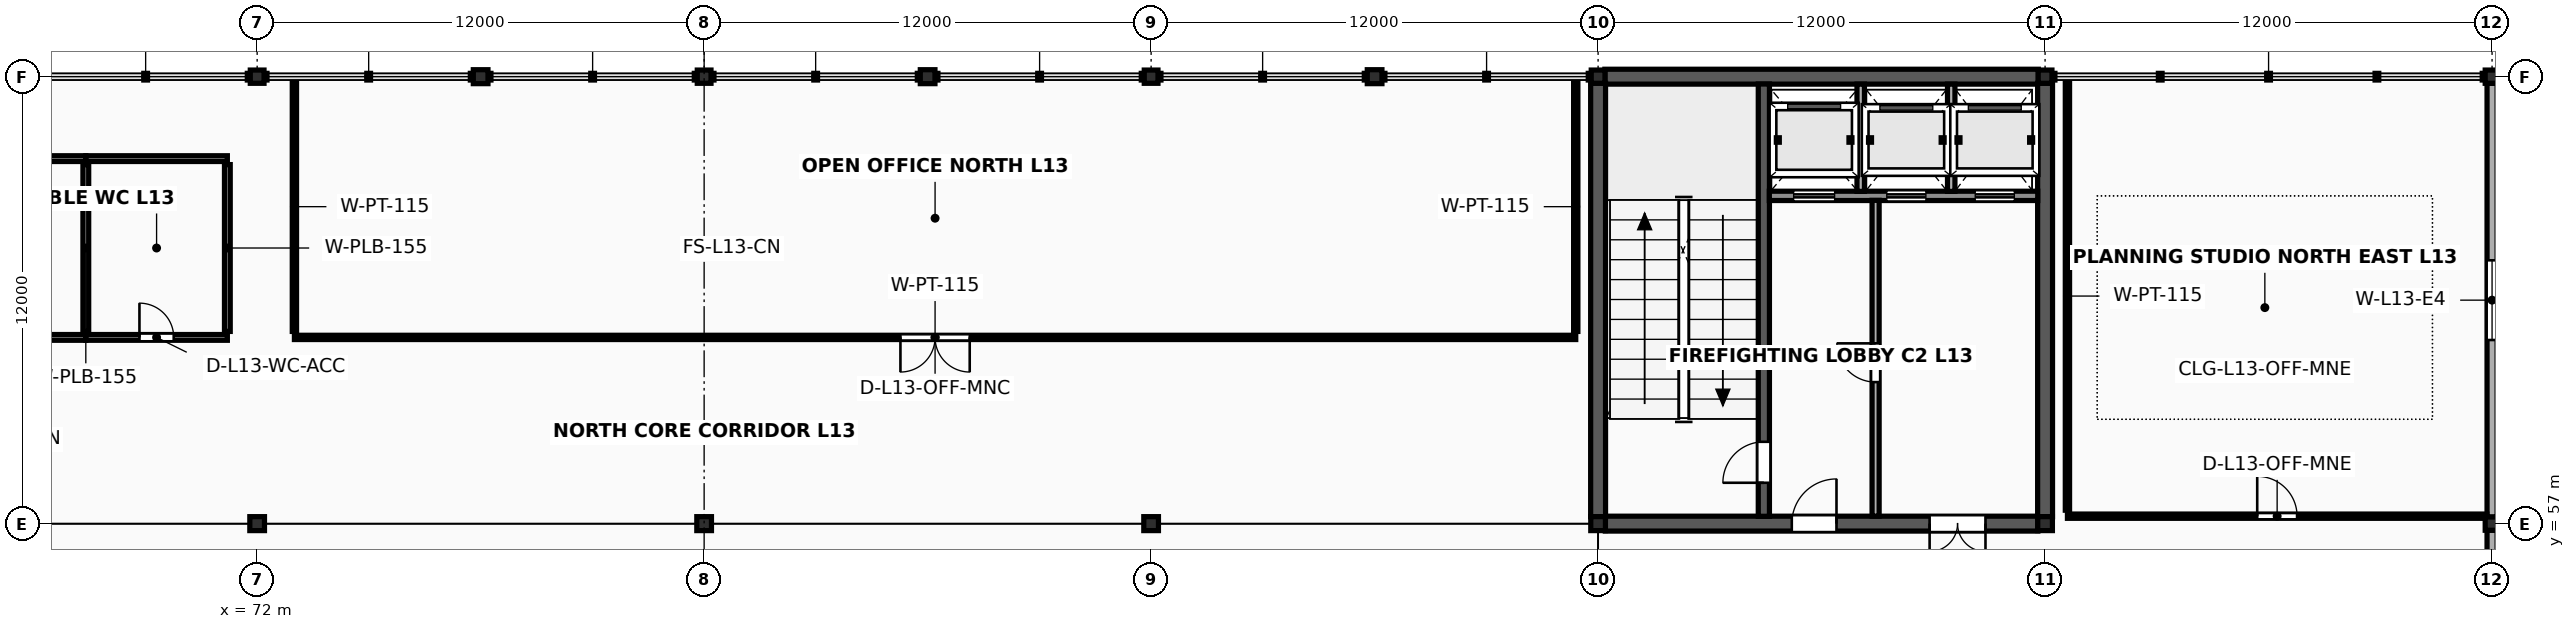
"""IFC4 building model, lengths in metres.
Left out: names, types, materials, properties, quantities, classifications, styles, units other than length and angle.
Written with IfcOpenShell. Run it as: python <this file> out.ifc"""

import sys

from ifc_helpers import new_model, si_unit, direction, frame, frame_2d, origin, origin_2d, place, context, subcontext, project, spatial, rectangle, i_section, extrude, element, fill, save


model = new_model("IFC4")
c1 = context("Model", 3, precision=1e-05, world=origin(), true_north=direction((0.0, 1.0)))
c2 = subcontext(c1, "Body", "Model", "MODEL_VIEW")
j1 = project(units=[si_unit("LENGTHUNIT", "METRE"), si_unit("PLANEANGLEUNIT", "RADIAN")], contexts=[c1])
p1 = place(None, origin())
s1 = spatial("IfcSite", under=j1, at=p1, CompositionType="ELEMENT")
p2 = place(p1, origin())
s2 = spatial("IfcBuilding", under=s1, at=p2, CompositionType="ELEMENT")
p3 = place(p2, frame((0.0, 0.0, 53.6)))
s3 = spatial("IfcBuildingStorey", under=s2, at=p3, CompositionType="ELEMENT", Elevation=53.6)
p4 = place(p3, frame((72.0, 57.0, 0.0), z_axis=(0.0, 0.0, 1.0), x_axis=(1.0, 0.0, 0.0)))
e1 = element("IfcColumn", 1, at=p4, inside=s3, PredefinedType="COLUMN", context=c2, shape_type="SweptSolid", body=[
    extrude(i_section(OverallWidth=0.394, OverallDepth=0.375, WebThickness=0.017, FlangeThickness=0.028, FilletRadius=0.018, at=origin_2d()), origin(), (0.0, 0.0, 1.0), 4.0),
])
p5 = place(p3, frame((72.0, 69.0, 0.0), z_axis=(0.0, 0.0, 1.0), x_axis=(1.0, 0.0, 0.0)))
e2 = element("IfcColumn", 2, at=p5, inside=s3, PredefinedType="COLUMN", context=c2, shape_type="SweptSolid", body=[
    extrude(i_section(OverallWidth=0.369, OverallDepth=0.356, WebThickness=0.011, FlangeThickness=0.018, FilletRadius=0.018, at=origin_2d()), origin(), (0.0, 0.0, 1.0), 4.0),
])
p6 = place(p3, frame((84.0, 57.0, 0.0), z_axis=(0.0, 0.0, 1.0), x_axis=(1.0, 0.0, 0.0)))
e3 = element("IfcColumn", 3, at=p6, inside=s3, PredefinedType="COLUMN", context=c2, shape_type="SweptSolid", body=[
    extrude(i_section(OverallWidth=0.394, OverallDepth=0.375, WebThickness=0.017, FlangeThickness=0.028, FilletRadius=0.018, at=origin_2d()), origin(), (0.0, 0.0, 1.0), 4.0),
])
p7 = place(p3, frame((84.0, 69.0, 0.0), z_axis=(0.0, 0.0, 1.0), x_axis=(1.0, 0.0, 0.0)))
e4 = element("IfcColumn", 4, at=p7, inside=s3, PredefinedType="COLUMN", context=c2, shape_type="SweptSolid", body=[
    extrude(i_section(OverallWidth=0.369, OverallDepth=0.356, WebThickness=0.011, FlangeThickness=0.018, FilletRadius=0.018, at=origin_2d()), origin(), (0.0, 0.0, 1.0), 4.0),
])
p8 = place(p3, frame((96.0, 57.0, 0.0), z_axis=(0.0, 0.0, 1.0), x_axis=(1.0, 0.0, 0.0)))
e5 = element("IfcColumn", 5, at=p8, inside=s3, PredefinedType="COLUMN", context=c2, shape_type="SweptSolid", body=[
    extrude(i_section(OverallWidth=0.394, OverallDepth=0.375, WebThickness=0.017, FlangeThickness=0.028, FilletRadius=0.018, at=origin_2d()), origin(), (0.0, 0.0, 1.0), 4.0),
])
p9 = place(p3, frame((96.0, 69.0, 0.0), z_axis=(0.0, 0.0, 1.0), x_axis=(1.0, 0.0, 0.0)))
e6 = element("IfcColumn", 6, at=p9, inside=s3, PredefinedType="COLUMN", context=c2, shape_type="SweptSolid", body=[
    extrude(i_section(OverallWidth=0.369, OverallDepth=0.356, WebThickness=0.011, FlangeThickness=0.018, FilletRadius=0.018, at=origin_2d()), origin(), (0.0, 0.0, 1.0), 4.0),
])
p10 = place(p3, frame((108.0, 57.0, 0.0), z_axis=(0.0, 0.0, 1.0), x_axis=(1.0, 0.0, 0.0)))
e7 = element("IfcColumn", 7, at=p10, inside=s3, PredefinedType="COLUMN", context=c2, shape_type="SweptSolid", body=[
    extrude(i_section(OverallWidth=0.394, OverallDepth=0.375, WebThickness=0.017, FlangeThickness=0.028, FilletRadius=0.018, at=origin_2d()), origin(), (0.0, 0.0, 1.0), 4.0),
])
p11 = place(p3, frame((108.0, 69.0, 0.0), z_axis=(0.0, 0.0, 1.0), x_axis=(1.0, 0.0, 0.0)))
e8 = element("IfcColumn", 8, at=p11, inside=s3, PredefinedType="COLUMN", context=c2, shape_type="SweptSolid", body=[
    extrude(i_section(OverallWidth=0.369, OverallDepth=0.356, WebThickness=0.011, FlangeThickness=0.018, FilletRadius=0.018, at=origin_2d()), origin(), (0.0, 0.0, 1.0), 4.0),
])
p12 = place(p3, frame((120.0, 57.0, 0.0), z_axis=(0.0, 0.0, 1.0), x_axis=(1.0, 0.0, 0.0)))
e9 = element("IfcColumn", 9, at=p12, inside=s3, PredefinedType="COLUMN", context=c2, shape_type="SweptSolid", body=[
    extrude(i_section(OverallWidth=0.394, OverallDepth=0.375, WebThickness=0.017, FlangeThickness=0.028, FilletRadius=0.018, at=origin_2d()), origin(), (0.0, 0.0, 1.0), 4.0),
])
for number, where, z_axis, x_axis in (
    (10, (120.0, 69.0, 0.0), (0.0, 0.0, 1.0), (1.0, 0.0, 0.0)),
    (11, (132.0, 57.0, 0.0), (0.0, 0.0, 1.0), (1.0, 0.0, 0.0)),
    (12, (132.0, 69.0, 0.0), (0.0, 0.0, 1.0), (1.0, 0.0, 0.0)),
):
    element("IfcColumn", number, at=place(p3, frame(where, z_axis=z_axis, x_axis=x_axis)), inside=s3, PredefinedType="COLUMN", context=c2, shape_type="SweptSolid", body=[
        extrude(i_section(OverallWidth=0.369, OverallDepth=0.356, WebThickness=0.011, FlangeThickness=0.018, FilletRadius=0.018, at=origin_2d()), origin(), (0.0, 0.0, 1.0), 4.0),
    ])
for number, where, z_axis, x_axis in (
    (13, (78.0, 69.0, 0.0), (0.0, 0.0, 1.0), (1.0, 0.0, 0.0)),
    (14, (90.0, 69.0, 0.0), (0.0, 0.0, 1.0), (1.0, 0.0, 0.0)),
    (15, (102.0, 69.0, 0.0), (0.0, 0.0, 1.0), (1.0, 0.0, 0.0)),
):
    element("IfcColumn", number, at=place(p3, frame(where, z_axis=z_axis, x_axis=x_axis)), inside=s3, PredefinedType="COLUMN", context=c2, shape_type="SweptSolid", body=[
        extrude(i_section(OverallWidth=0.394, OverallDepth=0.375, WebThickness=0.017, FlangeThickness=0.028, FilletRadius=0.018, at=origin_2d()), origin(), (0.0, 0.0, 1.0), 4.0),
    ])
p13 = place(p3, frame((108.194, 57.0, 0.0), z_axis=(0.0, 0.0, 1.0), x_axis=(1.0, 0.0, 0.0)))
e16 = element("IfcWall", 16, at=p13, inside=s3, PredefinedType="SHEAR", context=c2, shape_type="SweptSolid", body=[
    extrude(rectangle(XDim=11.612, YDim=0.4, at=frame_2d((5.806, 0.0))), origin(), (0.0, 0.0, 1.0), 3.818),
])
p14 = place(p13, frame((5.006, 0.0, 0.0)))
e17 = element("IfcOpeningElement", 17, at=p14, cuts=e16, PredefinedType="OPENING", context=c2, shape_type="SweptSolid", body=[
    extrude(rectangle(XDim=1.2, YDim=2.2, at=frame_2d((0.6, 1.1))), frame((0.0, 0.215, 0.0), z_axis=(0.0, -1.0, 0.0), x_axis=(1.0, 0.0, 0.0)), (0.0, 0.0, 1.0), 0.43),
])
p15 = place(p13, frame((8.706, 0.0, 0.0)))
e18 = element("IfcOpeningElement", 18, at=p15, cuts=e16, PredefinedType="OPENING", context=c2, shape_type="SweptSolid", body=[
    extrude(rectangle(XDim=1.5, YDim=2.25, at=frame_2d((0.75, 1.125))), frame((0.0, 0.215, 0.0), z_axis=(0.0, -1.0, 0.0), x_axis=(1.0, 0.0, 0.0)), (0.0, 0.0, 1.0), 0.43),
])
p16 = place(p3, frame((108.181, 69.0, 0.0), z_axis=(0.0, 0.0, 1.0), x_axis=(1.0, 0.0, 0.0)))
e19 = element("IfcWall", 19, at=p16, inside=s3, PredefinedType="SHEAR", context=c2, shape_type="SweptSolid", body=[
    extrude(rectangle(XDim=11.637, YDim=0.4, at=frame_2d((5.819, 0.0))), origin(), (0.0, 0.0, 1.0), 3.818),
])
for number, where, z_axis, x_axis in (
    (20, (108.0, 57.185, 0.0), (0.0, 0.0, 1.0), (0.0, 1.0, 0.0)),
    (21, (120.0, 57.185, 0.0), (0.0, 0.0, 1.0), (0.0, 1.0, 0.0)),
):
    element("IfcWall", number, at=place(p3, frame(where, z_axis=z_axis, x_axis=x_axis)), inside=s3, PredefinedType="SHEAR", context=c2, shape_type="SweptSolid", body=[
        extrude(rectangle(XDim=11.64, YDim=0.4, at=frame_2d((5.82, 0.0))), origin(), (0.0, 0.0, 1.0), 3.818),
    ])
p17 = place(p3, frame((112.45, 57.197, 0.0), z_axis=(0.0, 0.0, 1.0), x_axis=(0.0, 1.0, 0.0)))
e22 = element("IfcWall", 22, at=p17, inside=s3, PredefinedType="SHEAR", context=c2, shape_type="SweptSolid", body=[
    extrude(rectangle(XDim=11.606, YDim=0.3, at=frame_2d((5.803, 0.0))), origin(), (0.0, 0.0, 1.0), 3.818),
])
p18 = place(p17, frame((0.9, 0.0, 0.0)))
e23 = element("IfcOpeningElement", 23, at=p18, cuts=e22, PredefinedType="OPENING", context=c2, shape_type="SweptSolid", body=[
    extrude(rectangle(XDim=1.1, YDim=2.2, at=frame_2d((0.55, 1.1))), frame((0.0, 0.165, 0.0), z_axis=(0.0, -1.0, 0.0), x_axis=(1.0, 0.0, 0.0)), (0.0, 0.0, 1.0), 0.33),
])
p19 = place(p3, frame((112.597, 65.8, 0.0), z_axis=(0.0, 0.0, 1.0), x_axis=(1.0, 0.0, 0.0)))
e24 = element("IfcWall", 24, at=p19, inside=s3, PredefinedType="SOLIDWALL", context=c2, shape_type="SweptSolid", body=[
    extrude(rectangle(XDim=7.206, YDim=0.25, at=frame_2d((3.603, 0.0))), origin(), (0.0, 0.0, 1.0), 3.818),
])
p20 = place(p19, frame((0.653, 0.0, 0.0)))
e25 = element("IfcOpeningElement", 25, at=p20, cuts=e24, PredefinedType="OPENING", context=c2, shape_type="SweptSolid", body=[
    extrude(rectangle(XDim=1.1, YDim=2.24, at=frame_2d((0.55, 1.12))), frame((0.0, 0.14, 0.0), z_axis=(0.0, -1.0, 0.0), x_axis=(1.0, 0.0, 0.0)), (0.0, 0.0, 1.0), 0.28),
])
p21 = place(p19, frame((3.153, 0.0, 0.0)))
e26 = element("IfcOpeningElement", 26, at=p21, cuts=e24, PredefinedType="OPENING", context=c2, shape_type="SweptSolid", body=[
    extrude(rectangle(XDim=1.05, YDim=2.2, at=frame_2d((0.525, 1.1))), frame((0.0, 0.14, 0.0), z_axis=(0.0, -1.0, 0.0), x_axis=(1.0, 0.0, 0.0)), (0.0, 0.0, 1.0), 0.28),
])
p22 = place(p19, frame((5.528, 0.0, 0.0)))
e27 = element("IfcOpeningElement", 27, at=p22, cuts=e24, PredefinedType="OPENING", context=c2, shape_type="SweptSolid", body=[
    extrude(rectangle(XDim=1.05, YDim=2.2, at=frame_2d((0.525, 1.1))), frame((0.0, 0.14, 0.0), z_axis=(0.0, -1.0, 0.0), x_axis=(1.0, 0.0, 0.0)), (0.0, 0.0, 1.0), 0.28),
])
for number, where, z_axis, x_axis in (
    (28, (115.05, 65.92, 0.0), (0.0, 0.0, 1.0), (0.0, 1.0, 0.0)),
    (29, (117.48, 65.92, 0.0), (0.0, 0.0, 1.0), (0.0, 1.0, 0.0)),
):
    element("IfcWall", number, at=place(p3, frame(where, z_axis=z_axis, x_axis=x_axis)), inside=s3, PredefinedType="SOLIDWALL", context=c2, shape_type="SweptSolid", body=[
        extrude(rectangle(XDim=2.88, YDim=0.2, at=frame_2d((1.44, 0.0))), origin(), (0.0, 0.0, 1.0), 3.808),
    ])
p23 = place(p3, frame((115.45, 57.2, 0.0), z_axis=(0.0, 0.0, 1.0), x_axis=(0.0, 1.0, 0.0)))
e30 = element("IfcWall", 30, at=p23, inside=s3, PredefinedType="SOLIDWALL", context=c2, shape_type="SweptSolid", body=[
    extrude(rectangle(XDim=8.48, YDim=0.19, at=frame_2d((4.24, 0.0))), origin(), (0.0, 0.0, 1.0), 3.808),
])
p24 = place(p23, frame((3.6, 0.0, 0.0)))
e31 = element("IfcOpeningElement", 31, at=p24, cuts=e30, PredefinedType="OPENING", context=c2, shape_type="SweptSolid", body=[
    extrude(rectangle(XDim=1.04, YDim=2.18, at=frame_2d((0.52, 1.09))), frame((0.0, 0.11, 0.0), z_axis=(0.0, -1.0, 0.0), x_axis=(1.0, 0.0, 0.0)), (0.0, 0.0, 1.0), 0.22),
])
p25 = place(p3, frame((132.0, 45.176, 0.0), z_axis=(0.0, 0.0, 1.0), x_axis=(0.0, 1.0, 0.0)))
e32 = element("IfcWall", 32, at=p25, inside=s3, PredefinedType="SOLIDWALL", context=c2, shape_type="SweptSolid", body=[
    extrude(rectangle(XDim=11.648, YDim=0.27, at=frame_2d((5.824, 0.0))), origin(), (0.0, 0.0, 1.0), 3.271),
])
p26 = place(p25, frame((4.834, 0.0, 0.78)))
e33 = element("IfcOpeningElement", 33, at=p26, cuts=e32, PredefinedType="OPENING", context=c2, shape_type="SweptSolid", body=[
    extrude(rectangle(XDim=1.98, YDim=1.58, at=frame_2d((0.99, 0.79))), frame((0.0, 0.15, 0.0), z_axis=(0.0, -1.0, 0.0), x_axis=(1.0, 0.0, 0.0)), (0.0, 0.0, 1.0), 0.3),
])
p27 = place(p3, frame((132.0, 57.176, 0.0), z_axis=(0.0, 0.0, 1.0), x_axis=(0.0, 1.0, 0.0)))
e34 = element("IfcWall", 34, at=p27, inside=s3, PredefinedType="SOLIDWALL", context=c2, shape_type="SweptSolid", body=[
    extrude(rectangle(XDim=11.648, YDim=0.27, at=frame_2d((5.824, 0.0))), origin(), (0.0, 0.0, 1.0), 3.271),
])
p28 = place(p27, frame((4.754, 0.0, 0.78)))
e35 = element("IfcOpeningElement", 35, at=p28, cuts=e34, PredefinedType="OPENING", context=c2, shape_type="SweptSolid", body=[
    extrude(rectangle(XDim=2.14, YDim=1.58, at=frame_2d((1.07, 0.79))), frame((0.0, 0.15, 0.0), z_axis=(0.0, -1.0, 0.0), x_axis=(1.0, 0.0, 0.0)), (0.0, 0.0, 1.0), 0.3),
])
p29 = place(p3, frame((62.0, 62.0, 0.0), z_axis=(0.0, 0.0, 1.0), x_axis=(1.0, 0.0, 0.0)))
e36 = element("IfcWall", 36, at=p29, inside=s3, PredefinedType="PLUMBINGWALL", context=c2, shape_type="SweptSolid", body=[
    extrude(rectangle(XDim=5.4, YDim=0.155, at=frame_2d((2.7, 0.0))), origin(), (0.0, 0.0, 1.0), 2.88),
])
p30 = place(p29, frame((2.065, 0.0, 0.0)))
e37 = element("IfcOpeningElement", 37, at=p30, cuts=e36, PredefinedType="OPENING", context=c2, shape_type="SweptSolid", body=[
    extrude(rectangle(XDim=1.27, YDim=2.27, at=frame_2d((0.635, 1.135))), frame((0.0, 0.093, 0.0), z_axis=(0.0, -1.0, 0.0), x_axis=(1.0, 0.0, 0.0)), (0.0, 0.0, 1.0), 0.185),
])
p31 = place(p3, frame((62.0, 66.8, 0.0), z_axis=(0.0, 0.0, 1.0), x_axis=(1.0, 0.0, 0.0)))
e38 = element("IfcWall", 38, at=p31, inside=s3, PredefinedType="PLUMBINGWALL", context=c2, shape_type="SweptSolid", body=[
    extrude(rectangle(XDim=5.4, YDim=0.155, at=frame_2d((2.7, 0.0))), origin(), (0.0, 0.0, 1.0), 2.88),
])
p32 = place(p3, frame((67.4, 62.16, 0.0), z_axis=(0.0, 0.0, 1.0), x_axis=(0.0, 1.0, 0.0)))
e39 = element("IfcWall", 39, at=p32, inside=s3, PredefinedType="PLUMBINGWALL", context=c2, shape_type="SweptSolid", body=[
    extrude(rectangle(XDim=4.48, YDim=0.155, at=frame_2d((2.24, 0.0))), origin(), (0.0, 0.0, 1.0), 2.88),
])
p33 = place(p3, frame((67.4, 62.0, 0.0), z_axis=(0.0, 0.0, 1.0), x_axis=(1.0, 0.0, 0.0)))
e40 = element("IfcWall", 40, at=p33, inside=s3, PredefinedType="PLUMBINGWALL", context=c2, shape_type="SweptSolid", body=[
    extrude(rectangle(XDim=3.8, YDim=0.155, at=frame_2d((1.9, 0.0))), origin(), (0.0, 0.0, 1.0), 2.88),
])
p34 = place(p33, frame((1.44, 0.0, 0.0)))
e41 = element("IfcOpeningElement", 41, at=p34, cuts=e40, PredefinedType="OPENING", context=c2, shape_type="SweptSolid", body=[
    extrude(rectangle(XDim=0.92, YDim=2.1, at=frame_2d((0.46, 1.05))), frame((0.0, 0.093, 0.0), z_axis=(0.0, -1.0, 0.0), x_axis=(1.0, 0.0, 0.0)), (0.0, 0.0, 1.0), 0.185),
])
p35 = place(p3, frame((67.4, 66.8, 0.0), z_axis=(0.0, 0.0, 1.0), x_axis=(1.0, 0.0, 0.0)))
e42 = element("IfcWall", 42, at=p35, inside=s3, PredefinedType="PLUMBINGWALL", context=c2, shape_type="SweptSolid", body=[
    extrude(rectangle(XDim=3.8, YDim=0.155, at=frame_2d((1.9, 0.0))), origin(), (0.0, 0.0, 1.0), 2.88),
])
p36 = place(p3, frame((71.2, 62.16, 0.0), z_axis=(0.0, 0.0, 1.0), x_axis=(0.0, 1.0, 0.0)))
e43 = element("IfcWall", 43, at=p36, inside=s3, PredefinedType="PLUMBINGWALL", context=c2, shape_type="SweptSolid", body=[
    extrude(rectangle(XDim=4.48, YDim=0.155, at=frame_2d((2.24, 0.0))), origin(), (0.0, 0.0, 1.0), 2.88),
])
p37 = place(p3, frame((73.0, 62.0, 0.0), z_axis=(0.0, 0.0, 1.0), x_axis=(1.0, 0.0, 0.0)))
e44 = element("IfcWall", 44, at=p37, inside=s3, PredefinedType="PARTITIONING", context=c2, shape_type="SweptSolid", body=[
    extrude(rectangle(XDim=34.4, YDim=0.115, at=frame_2d((17.2, 0.0))), origin(), (0.0, 0.0, 1.0), 2.88),
])
p38 = place(p37, frame((16.27, 0.0, 0.0)))
e45 = element("IfcOpeningElement", 45, at=p38, cuts=e44, PredefinedType="OPENING", context=c2, shape_type="SweptSolid", body=[
    extrude(rectangle(XDim=1.86, YDim=2.41, at=frame_2d((0.93, 1.205))), frame((0.0, 0.073, 0.0), z_axis=(0.0, -1.0, 0.0), x_axis=(1.0, 0.0, 0.0)), (0.0, 0.0, 1.0), 0.145),
])
for number, where, z_axis, x_axis in (
    (46, (73.0, 62.16, 0.0), (0.0, 0.0, 1.0), (0.0, 1.0, 0.0)),
    (47, (107.4, 62.16, 0.0), (0.0, 0.0, 1.0), (0.0, 1.0, 0.0)),
):
    element("IfcWall", number, at=place(p3, frame(where, z_axis=z_axis, x_axis=x_axis)), inside=s3, PredefinedType="PARTITIONING", context=c2, shape_type="SweptSolid", body=[
        extrude(rectangle(XDim=6.7, YDim=0.115, at=frame_2d((3.35, 0.0))), origin(), (0.0, 0.0, 1.0), 2.88),
    ])
p39 = place(p3, frame((120.6, 57.2, 0.0), z_axis=(0.0, 0.0, 1.0), x_axis=(1.0, 0.0, 0.0)))
e48 = element("IfcWall", 48, at=p39, inside=s3, PredefinedType="PARTITIONING", context=c2, shape_type="SweptSolid", body=[
    extrude(rectangle(XDim=11.26, YDim=0.115, at=frame_2d((5.63, 0.0))), origin(), (0.0, 0.0, 1.0), 2.88),
])
p40 = place(p39, frame((5.095, 0.0, 0.0)))
e49 = element("IfcOpeningElement", 49, at=p40, cuts=e48, PredefinedType="OPENING", context=c2, shape_type="SweptSolid", body=[
    extrude(rectangle(XDim=1.07, YDim=2.19, at=frame_2d((0.535, 1.095))), frame((0.0, 0.073, 0.0), z_axis=(0.0, -1.0, 0.0), x_axis=(1.0, 0.0, 0.0)), (0.0, 0.0, 1.0), 0.145),
])
p41 = place(p3, frame((120.6, 57.36, 0.0), z_axis=(0.0, 0.0, 1.0), x_axis=(0.0, 1.0, 0.0)))
e50 = element("IfcWall", 50, at=p41, inside=s3, PredefinedType="PARTITIONING", context=c2, shape_type="SweptSolid", body=[
    extrude(rectangle(XDim=11.5, YDim=0.115, at=frame_2d((5.75, 0.0))), origin(), (0.0, 0.0, 1.0), 2.88),
])
p42 = place(p28, origin())
e51 = element("IfcWindow", 51, at=p42, inside=s3, PartitioningType="DOUBLE_PANEL_VERTICAL", PredefinedType="WINDOW", context=c2, shape_type="SweptSolid", body=[
    extrude(rectangle(XDim=2.14, YDim=1.58, at=frame_2d((1.07, 0.79))), frame((0.0, 0.03, 0.0), z_axis=(0.0, -1.0, 0.0), x_axis=(1.0, 0.0, 0.0)), (0.0, 0.0, 1.0), 0.06),
])
fill(e35, e51)
p43 = place(p18, origin())
e52 = element("IfcDoor", 52, at=p43, inside=s3, OperationType="SINGLE_SWING_LEFT", PredefinedType="DOOR", context=c2, shape_type="SweptSolid", body=[
    extrude(rectangle(XDim=1.1, YDim=2.2, at=frame_2d((0.55, 1.1))), frame((0.0, 0.025, 0.0), z_axis=(0.0, -1.0, 0.0), x_axis=(1.0, 0.0, 0.0)), (0.0, 0.0, 1.0), 0.05),
])
fill(e23, e52)
p44 = place(p24, origin())
e53 = element("IfcDoor", 53, at=p44, inside=s3, OperationType="SINGLE_SWING_RIGHT", PredefinedType="DOOR", context=c2, shape_type="SweptSolid", body=[
    extrude(rectangle(XDim=1.04, YDim=2.18, at=frame_2d((0.52, 1.09))), frame((0.0, 0.025, 0.0), z_axis=(0.0, -1.0, 0.0), x_axis=(1.0, 0.0, 0.0)), (0.0, 0.0, 1.0), 0.05),
])
fill(e31, e53)
p45 = place(p14, origin())
e54 = element("IfcDoor", 54, at=p45, inside=s3, OperationType="SINGLE_SWING_RIGHT", PredefinedType="DOOR", context=c2, shape_type="SweptSolid", body=[
    extrude(rectangle(XDim=1.2, YDim=2.2, at=frame_2d((0.6, 1.1))), frame((0.0, 0.025, 0.0), z_axis=(0.0, -1.0, 0.0), x_axis=(1.0, 0.0, 0.0)), (0.0, 0.0, 1.0), 0.05),
])
fill(e17, e54)
p46 = place(p15, origin())
e55 = element("IfcDoor", 55, at=p46, inside=s3, OperationType="DOUBLE_DOOR_SINGLE_SWING", PredefinedType="DOOR", context=c2, shape_type="SweptSolid", body=[
    extrude(rectangle(XDim=1.5, YDim=2.25, at=frame_2d((0.75, 1.125))), frame((0.0, 0.025, 0.0), z_axis=(0.0, -1.0, 0.0), x_axis=(1.0, 0.0, 0.0)), (0.0, 0.0, 1.0), 0.05),
])
fill(e18, e55)
p47 = place(p20, origin())
e56 = element("IfcDoor", 56, at=p47, inside=s3, OperationType="SLIDING_TO_LEFT", PredefinedType="USERDEFINED", context=c2, shape_type="SweptSolid", body=[
    extrude(rectangle(XDim=1.1, YDim=2.24, at=frame_2d((0.55, 1.12))), frame((0.0, 0.025, 0.0), z_axis=(0.0, -1.0, 0.0), x_axis=(1.0, 0.0, 0.0)), (0.0, 0.0, 1.0), 0.05),
])
fill(e25, e56)
p48 = place(p21, origin())
e57 = element("IfcDoor", 57, at=p48, inside=s3, OperationType="SLIDING_TO_LEFT", PredefinedType="USERDEFINED", context=c2, shape_type="SweptSolid", body=[
    extrude(rectangle(XDim=1.05, YDim=2.2, at=frame_2d((0.525, 1.1))), frame((0.0, 0.025, 0.0), z_axis=(0.0, -1.0, 0.0), x_axis=(1.0, 0.0, 0.0)), (0.0, 0.0, 1.0), 0.05),
])
fill(e26, e57)
p49 = place(p22, origin())
e58 = element("IfcDoor", 58, at=p49, inside=s3, OperationType="SLIDING_TO_LEFT", PredefinedType="USERDEFINED", context=c2, shape_type="SweptSolid", body=[
    extrude(rectangle(XDim=1.05, YDim=2.2, at=frame_2d((0.525, 1.1))), frame((0.0, 0.025, 0.0), z_axis=(0.0, -1.0, 0.0), x_axis=(1.0, 0.0, 0.0)), (0.0, 0.0, 1.0), 0.05),
])
fill(e27, e58)
p50 = place(p34, origin())
e59 = element("IfcDoor", 59, at=p50, inside=s3, OperationType="SINGLE_SWING_LEFT", PredefinedType="DOOR", context=c2, shape_type="SweptSolid", body=[
    extrude(rectangle(XDim=0.92, YDim=2.1, at=frame_2d((0.46, 1.05))), frame((0.0, 0.025, 0.0), z_axis=(0.0, -1.0, 0.0), x_axis=(1.0, 0.0, 0.0)), (0.0, 0.0, 1.0), 0.05),
])
fill(e41, e59)
p51 = place(p38, origin())
e60 = element("IfcDoor", 60, at=p51, inside=s3, OperationType="DOUBLE_DOOR_SINGLE_SWING", PredefinedType="DOOR", context=c2, shape_type="SweptSolid", body=[
    extrude(rectangle(XDim=1.86, YDim=2.41, at=frame_2d((0.93, 1.205))), frame((0.0, 0.025, 0.0), z_axis=(0.0, -1.0, 0.0), x_axis=(1.0, 0.0, 0.0)), (0.0, 0.0, 1.0), 0.05),
])
fill(e45, e60)
p52 = place(p40, origin())
e61 = element("IfcDoor", 61, at=p52, inside=s3, OperationType="SINGLE_SWING_LEFT", PredefinedType="DOOR", context=c2, shape_type="SweptSolid", body=[
    extrude(rectangle(XDim=1.07, YDim=2.19, at=frame_2d((0.535, 1.095))), frame((0.0, 0.025, 0.0), z_axis=(0.0, -1.0, 0.0), x_axis=(1.0, 0.0, 0.0)), (0.0, 0.0, 1.0), 0.05),
])
fill(e49, e61)
save(model, sys.argv[1])
